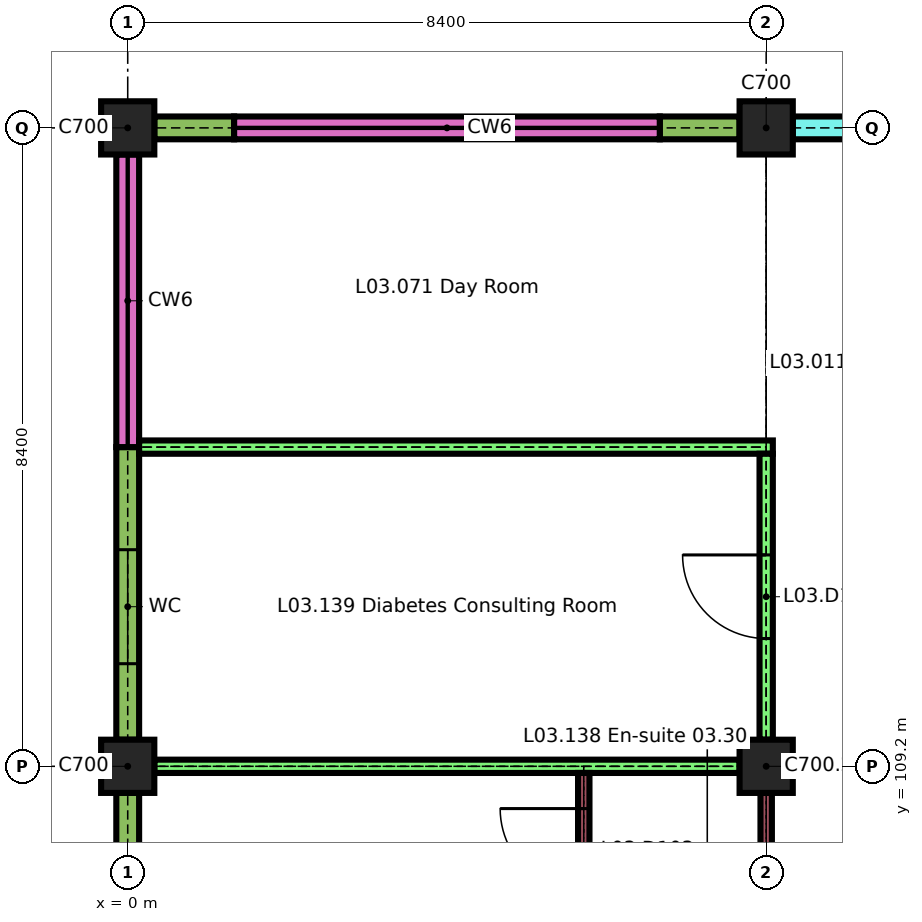
"""IFC4 building model, lengths in metres.
Left out: names, types, materials, properties, quantities, classifications, styles, units other than length and angle.
Written with IfcOpenShell. Run it as: python <this file> out.ifc"""

import sys

from ifc_helpers import new_model, si_unit, direction, frame, frame_2d, origin, origin_2d, place, context, subcontext, project, spatial, rectangle, extrude, element, fill, save


model = new_model("IFC4")
c1 = context("Model", 3, precision=1e-05, world=origin(), true_north=direction((0.0, 1.0)))
c2 = subcontext(c1, "Body", "Model", "MODEL_VIEW")
j1 = project(units=[si_unit("LENGTHUNIT", "METRE"), si_unit("PLANEANGLEUNIT", "RADIAN")], contexts=[c1])
p1 = place(None, origin())
s1 = spatial("IfcSite", under=j1, at=p1, CompositionType="ELEMENT")
p2 = place(p1, origin())
s2 = spatial("IfcBuilding", under=s1, at=p2, CompositionType="ELEMENT")
p3 = place(p2, frame((0.0, 0.0, 15.3)))
s3 = spatial("IfcBuildingStorey", under=s2, at=p3, CompositionType="ELEMENT", Elevation=15.3)
for number, where, z_axis, x_axis in (
    (1, (0.0, 109.2, 0.0), (0.0, 0.0, 1.0), (1.0, 0.0, 0.0)),
    (2, (8.4, 109.2, 0.0), (0.0, 0.0, 1.0), (1.0, 0.0, 0.0)),
    (3, (0.0, 117.6, 0.0), (0.0, 0.0, 1.0), (1.0, 0.0, 0.0)),
    (4, (8.4, 117.6, 0.0), (0.0, 0.0, 1.0), (1.0, 0.0, 0.0)),
):
    element("IfcColumn", number, at=place(p3, frame(where, z_axis=z_axis, x_axis=x_axis)), inside=s3, PredefinedType="COLUMN", context=c2, shape_type="SweptSolid", body=[
        extrude(rectangle(XDim=0.7, YDim=0.7, at=origin_2d()), origin(), (0.0, 0.0, 1.0), 3.26),
    ])
p4 = place(p3, frame((0.35, 117.6, 0.0), z_axis=(0.0, 0.0, 1.0), x_axis=(1.0, 0.0, 0.0)))
e5 = element("IfcWall", 5, at=p4, inside=s3, PredefinedType="SOLIDWALL", context=c2, shape_type="SweptSolid", body=[
    extrude(rectangle(XDim=1.05, YDim=0.3, at=frame_2d((0.525, 0.0))), origin(), (0.0, 0.0, 1.0), 2.96),
])
p5 = place(p3, frame((7.0, 117.6, 0.0), z_axis=(0.0, 0.0, 1.0), x_axis=(1.0, 0.0, 0.0)))
e6 = element("IfcWall", 6, at=p5, inside=s3, PredefinedType="SOLIDWALL", context=c2, shape_type="SweptSolid", body=[
    extrude(rectangle(XDim=1.05, YDim=0.3, at=frame_2d((0.525, 0.0))), origin(), (0.0, 0.0, 1.0), 2.96),
])
p6 = place(p3, frame((1.4, 117.6, 0.0), z_axis=(0.0, 0.0, 1.0), x_axis=(1.0, 0.0, 0.0)))
e7 = element("IfcWall", 7, at=p6, inside=s3, PredefinedType="SOLIDWALL", context=c2, shape_type="SweptSolid", body=[
    extrude(rectangle(XDim=5.6, YDim=0.3, at=frame_2d((2.8, 0.0))), origin(), (0.0, 0.0, 1.0), 0.6),
])
p7 = place(p3, frame((8.75, 117.6, 0.0), z_axis=(0.0, 0.0, 1.0), x_axis=(1.0, 0.0, 0.0)))
e8 = element("IfcWall", 8, at=p7, inside=s3, PredefinedType="SOLIDWALL", context=c2, shape_type="SweptSolid", body=[
    extrude(rectangle(XDim=2.65, YDim=0.3, at=frame_2d((1.325, 0.0))), origin(), (0.0, 0.0, 1.0), 3.26),
])
p8 = place(p7, frame((1.3, 0.0, 0.9)))
e9 = element("IfcOpeningElement", 9, at=p8, cuts=e8, PredefinedType="OPENING", context=c2, shape_type="SweptSolid", body=[
    extrude(rectangle(XDim=0.9, YDim=1.5, at=frame_2d((0.45, 0.75))), frame((0.0, 0.16, 0.0), z_axis=(0.0, -1.0, 0.0), x_axis=(1.0, 0.0, 0.0)), (0.0, 0.0, 1.0), 0.32),
])
p9 = place(p3, frame((0.0, 105.0, 0.0), z_axis=(0.0, 0.0, 1.0), x_axis=(0.0, 1.0, 0.0)))
e10 = element("IfcWall", 10, at=p9, inside=s3, PredefinedType="SOLIDWALL", context=c2, shape_type="SweptSolid", body=[
    extrude(rectangle(XDim=3.85, YDim=0.3, at=frame_2d((1.925, 0.0))), origin(), (0.0, 0.0, 1.0), 2.96),
])
p10 = place(p9, frame((1.05, 0.0, 0.9)))
e11 = element("IfcOpeningElement", 11, at=p10, cuts=e10, PredefinedType="OPENING", context=c2, shape_type="SweptSolid", body=[
    extrude(rectangle(XDim=2.1, YDim=1.5, at=frame_2d((1.05, 0.75))), frame((0.0, 0.16, 0.0), z_axis=(0.0, -1.0, 0.0), x_axis=(1.0, 0.0, 0.0)), (0.0, 0.0, 1.0), 0.32),
])
p11 = place(p3, frame((0.0, 109.55, 0.0), z_axis=(0.0, 0.0, 1.0), x_axis=(0.0, 1.0, 0.0)))
e12 = element("IfcWall", 12, at=p11, inside=s3, PredefinedType="SOLIDWALL", context=c2, shape_type="SweptSolid", body=[
    extrude(rectangle(XDim=3.85, YDim=0.3, at=frame_2d((1.925, 0.0))), origin(), (0.0, 0.0, 1.0), 2.96),
])
p12 = place(p11, frame((1.0, 0.0, 0.9)))
e13 = element("IfcOpeningElement", 13, at=p12, cuts=e12, PredefinedType="OPENING", context=c2, shape_type="SweptSolid", body=[
    extrude(rectangle(XDim=1.5, YDim=1.5, at=frame_2d((0.75, 0.75))), frame((0.0, 0.16, 0.0), z_axis=(0.0, -1.0, 0.0), x_axis=(1.0, 0.0, 0.0)), (0.0, 0.0, 1.0), 0.32),
])
p13 = place(p3, frame((0.0, 113.4, 0.0), z_axis=(0.0, 0.0, 1.0), x_axis=(0.0, 1.0, 0.0)))
e14 = element("IfcWall", 14, at=p13, inside=s3, PredefinedType="SOLIDWALL", context=c2, shape_type="SweptSolid", body=[
    extrude(rectangle(XDim=3.85, YDim=0.3, at=frame_2d((1.925, 0.0))), origin(), (0.0, 0.0, 1.0), 0.6),
])
p14 = place(p3, frame((0.35, 109.2, 0.0), z_axis=(0.0, 0.0, 1.0), x_axis=(1.0, 0.0, 0.0)))
e15 = element("IfcWall", 15, at=p14, inside=s3, PredefinedType="PARTITIONING", context=c2, shape_type="SweptSolid", body=[
    extrude(rectangle(XDim=7.7, YDim=0.175, at=frame_2d((3.85, 0.0))), origin(), (0.0, 0.0, 1.0), 3.26),
])
p15 = place(p3, frame((0.15, 113.4, 0.0), z_axis=(0.0, 0.0, 1.0), x_axis=(1.0, 0.0, 0.0)))
e16 = element("IfcWall", 16, at=p15, inside=s3, PredefinedType="PARTITIONING", context=c2, shape_type="SweptSolid", body=[
    extrude(rectangle(XDim=8.338, YDim=0.175, at=frame_2d((4.169, 0.0))), origin(), (0.0, 0.0, 1.0), 3.26),
])
p16 = place(p3, frame((6.0, 107.075, 0.0), z_axis=(0.0, 0.0, 1.0), x_axis=(0.0, 1.0, 0.0)))
e17 = element("IfcWall", 17, at=p16, inside=s3, PredefinedType="PARTITIONING", context=c2, shape_type="SweptSolid", body=[
    extrude(rectangle(XDim=2.038, YDim=0.15, at=frame_2d((1.019, 0.0))), origin(), (0.0, 0.0, 1.0), 3.26),
])
p17 = place(p16, frame((0.469, 0.0, 0.0)))
e18 = element("IfcOpeningElement", 18, at=p17, cuts=e17, PredefinedType="OPENING", context=c2, shape_type="SweptSolid", body=[
    extrude(rectangle(XDim=1.1, YDim=2.1, at=frame_2d((0.55, 1.05))), frame((0.0, 0.085, 0.0), z_axis=(0.0, -1.0, 0.0), x_axis=(1.0, 0.0, 0.0)), (0.0, 0.0, 1.0), 0.17),
])
p18 = place(p3, frame((8.4, 101.15, 0.0), z_axis=(0.0, 0.0, 1.0), x_axis=(0.0, 1.0, 0.0)))
e19 = element("IfcWall", 19, at=p18, inside=s3, PredefinedType="PARTITIONING", context=c2, shape_type="SweptSolid", body=[
    extrude(rectangle(XDim=7.7, YDim=0.15, at=frame_2d((3.85, 0.0))), origin(), (0.0, 0.0, 1.0), 3.26),
])
p19 = place(p18, frame((2.1, 0.0, 0.0)))
e20 = element("IfcOpeningElement", 20, at=p19, cuts=e19, PredefinedType="OPENING", context=c2, shape_type="SweptSolid", body=[
    extrude(rectangle(XDim=1.5, YDim=2.4, at=frame_2d((0.75, 1.2))), frame((0.0, 0.085, 0.0), z_axis=(0.0, -1.0, 0.0), x_axis=(1.0, 0.0, 0.0)), (0.0, 0.0, 1.0), 0.17),
])
p20 = place(p18, frame((4.1, 0.0, 0.0)))
e21 = element("IfcOpeningElement", 21, at=p20, cuts=e19, PredefinedType="OPENING", context=c2, shape_type="SweptSolid", body=[
    extrude(rectangle(XDim=1.5, YDim=2.4, at=frame_2d((0.75, 1.2))), frame((0.0, 0.085, 0.0), z_axis=(0.0, -1.0, 0.0), x_axis=(1.0, 0.0, 0.0)), (0.0, 0.0, 1.0), 0.17),
])
p21 = place(p3, frame((8.4, 109.55, 0.0), z_axis=(0.0, 0.0, 1.0), x_axis=(0.0, 1.0, 0.0)))
e22 = element("IfcWall", 22, at=p21, inside=s3, PredefinedType="PARTITIONING", context=c2, shape_type="SweptSolid", body=[
    extrude(rectangle(XDim=3.762, YDim=0.175, at=frame_2d((1.881, 0.0))), origin(), (0.0, 0.0, 1.0), 3.26),
])
p22 = place(p21, frame((1.331, 0.0, 0.0)))
e23 = element("IfcOpeningElement", 23, at=p22, cuts=e22, PredefinedType="OPENING", context=c2, shape_type="SweptSolid", body=[
    extrude(rectangle(XDim=1.1, YDim=2.1, at=frame_2d((0.55, 1.05))), frame((0.0, 0.097, 0.0), z_axis=(0.0, -1.0, 0.0), x_axis=(1.0, 0.0, 0.0)), (0.0, 0.0, 1.0), 0.195),
])
p23 = place(p12, origin())
e24 = element("IfcWindow", 24, at=p23, inside=s3, PartitioningType="SINGLE_PANEL", PredefinedType="WINDOW", context=c2, shape_type="SweptSolid", body=[
    extrude(rectangle(XDim=1.5, YDim=1.5, at=frame_2d((0.75, 0.75))), frame((0.0, 0.03, 0.0), z_axis=(0.0, -1.0, 0.0), x_axis=(1.0, 0.0, 0.0)), (0.0, 0.0, 1.0), 0.06),
])
fill(e13, e24)
p24 = place(p17, origin())
e25 = element("IfcDoor", 25, at=p24, inside=s3, OperationType="SINGLE_SWING_LEFT", PredefinedType="DOOR", context=c2, shape_type="SweptSolid", body=[
    extrude(rectangle(XDim=1.1, YDim=2.1, at=frame_2d((0.55, 1.05))), frame((0.0, 0.025, 0.0), z_axis=(0.0, -1.0, 0.0), x_axis=(1.0, 0.0, 0.0)), (0.0, 0.0, 1.0), 0.05),
])
fill(e18, e25)
p25 = place(p22, origin())
e26 = element("IfcDoor", 26, at=p25, inside=s3, OperationType="SINGLE_SWING_LEFT", PredefinedType="DOOR", context=c2, shape_type="SweptSolid", body=[
    extrude(rectangle(XDim=1.1, YDim=2.1, at=frame_2d((0.55, 1.05))), frame((0.0, 0.035, 0.0), z_axis=(0.0, -1.0, 0.0), x_axis=(1.0, 0.0, 0.0)), (0.0, 0.0, 1.0), 0.07),
])
fill(e23, e26)
save(model, sys.argv[1])
